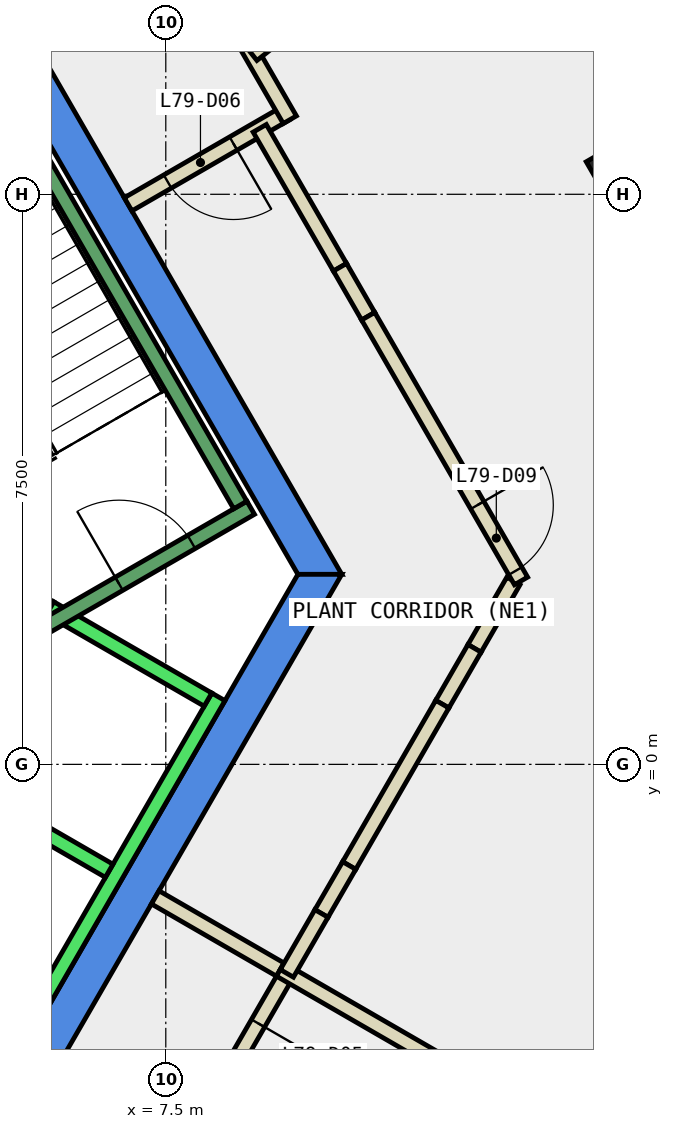
"""IFC4 building model, lengths in metres.
Left out: names, types, materials, properties, quantities, classifications, styles, units other than length and angle.
Written with IfcOpenShell. Run it as: python <this file> out.ifc"""

import sys

from ifc_helpers import new_model, si_unit, direction, frame, frame_2d, origin, origin_2d, place, context, subcontext, project, spatial, polyline, rectangle, outline, extrude, element, fill, save


model = new_model("IFC4")
c1 = context("Model", 3, precision=1e-05, world=origin(), true_north=direction((0.0, 1.0)))
c2 = subcontext(c1, "Body", "Model", "MODEL_VIEW")
j1 = project(units=[si_unit("LENGTHUNIT", "METRE"), si_unit("PLANEANGLEUNIT", "RADIAN")], contexts=[c1])
p1 = place(None, origin())
s1 = spatial("IfcSite", under=j1, at=p1, CompositionType="ELEMENT")
p2 = place(p1, origin())
s2 = spatial("IfcBuilding", under=s1, at=p2, CompositionType="ELEMENT")
p3 = place(p2, frame((0.0, 0.0, 335.9)))
s3 = spatial("IfcBuildingStorey", under=s2, at=p3, CompositionType="ELEMENT", Elevation=335.9)
p4 = place(p3, frame((13.51, 7.8, -0.35), z_axis=(0.0, 0.0, 1.0), x_axis=(-0.5, 0.866025403784, 0.0)))
e1 = element("IfcColumn", 1, at=p4, inside=s3, PredefinedType="COLUMN", context=c2, shape_type="SweptSolid", body=[
    extrude(rectangle(XDim=0.7, YDim=0.7, at=origin_2d()), origin(), (0.0, 0.0, 1.0), 4.4),
])
p5 = place(p3, frame((0.0, 0.0, -0.35)))
e2 = element("IfcWall", 2, at=p5, inside=s3, PredefinedType="SHEAR", context=c2, shape_type="SweptSolid", body=[
    extrude(outline(polyline([(5.486, 9.998), (5.053, 9.748), (9.238, 2.5), (9.815, 2.5), (5.486, 9.998)])), origin(), (0.0, 0.0, 1.0), 4.4),
])
p6 = place(p3, frame((0.0, 0.0, -0.35)))
e3 = element("IfcWall", 3, at=p6, inside=s3, PredefinedType="SHEAR", context=c2, shape_type="SweptSolid", body=[
    extrude(outline(polyline([(4.907, -6.0), (9.815, 2.5), (9.238, 2.5), (4.619, -5.5), (4.907, -6.0)])), origin(), (0.0, 0.0, 1.0), 4.4),
])
p7 = place(p3, frame((13.905, 8.604, 0.0), z_axis=(0.0, 0.0, 1.0), x_axis=(-0.509697735304, 0.86035354281, 0.0)))
e4 = element("IfcWall", 4, at=p7, inside=s3, PredefinedType="STANDARD", context=c2, shape_type="SweptSolid", body=[
    extrude(rectangle(XDim=7.098, YDim=0.3, at=frame_2d((3.549, 0.0))), origin(), (0.0, 0.0, 1.0), 4.05),
])
p8 = place(p7, frame((0.575, 0.0, 0.9)))
e5 = element("IfcOpeningElement", 5, at=p8, cuts=e4, PredefinedType="OPENING", context=c2, shape_type="SweptSolid", body=[
    extrude(rectangle(XDim=2.4, YDim=3.0, at=frame_2d((1.2, 1.5))), frame((0.0, 0.16, 0.0), z_axis=(0.0, -1.0, 0.0), x_axis=(1.0, 0.0, 0.0)), (0.0, 0.0, 1.0), 0.32),
])
p9 = place(p7, frame((4.124, 0.0, 0.9)))
e6 = element("IfcOpeningElement", 6, at=p9, cuts=e4, PredefinedType="OPENING", context=c2, shape_type="SweptSolid", body=[
    extrude(rectangle(XDim=2.4, YDim=3.0, at=frame_2d((1.2, 1.5))), frame((0.0, 0.16, 0.0), z_axis=(0.0, -1.0, 0.0), x_axis=(1.0, 0.0, 0.0)), (0.0, 0.0, 1.0), 0.32),
])
p10 = place(p3, frame((9.093, -2.75, 0.0), z_axis=(0.0, 0.0, 1.0), x_axis=(-0.500145398563, -0.865941441609, 0.0)))
e7 = element("IfcWall", 7, at=p10, inside=s3, PredefinedType="PARTITIONING", context=c2, shape_type="SweptSolid", body=[
    extrude(rectangle(XDim=1.815, YDim=0.2, at=frame_2d((0.908, 0.0))), origin(), (0.0, 0.0, 1.0), 4.05),
])
p11 = place(p10, frame((0.758, 0.0, 0.0)))
e8 = element("IfcOpeningElement", 8, at=p11, cuts=e7, PredefinedType="OPENING", context=c2, shape_type="SweptSolid", body=[
    extrude(rectangle(XDim=1.0, YDim=2.1, at=frame_2d((0.5, 1.05))), frame((0.0, 0.11, 0.0), z_axis=(0.0, -1.0, 0.0), x_axis=(1.0, 0.0, 0.0)), (0.0, 0.0, 1.0), 0.22),
])
p12 = place(p3, frame((7.361, -1.75, 0.0), z_axis=(0.0, 0.0, 1.0), x_axis=(0.865980106173, -0.500078449558, 0.0)))
e9 = element("IfcWall", 9, at=p12, inside=s3, PredefinedType="PARTITIONING", context=c2, shape_type="SweptSolid", body=[
    extrude(rectangle(XDim=1.9, YDim=0.2, at=frame_2d((0.95, 0.0))), origin(), (0.0, 0.0, 1.0), 4.05),
])
p13 = place(p3, frame((9.006, -2.7, 0.0), z_axis=(0.0, 0.0, 1.0), x_axis=(0.86601643423, -0.500015535402, 0.0)))
e10 = element("IfcWall", 10, at=p13, inside=s3, PredefinedType="PARTITIONING", context=c2, shape_type="SweptSolid", body=[
    extrude(rectangle(XDim=13.147, YDim=0.2, at=frame_2d((6.574, 0.0))), origin(), (0.0, 0.0, 1.0), 4.05),
])
p14 = place(p3, frame((9.082, 8.568, 0.0), z_axis=(0.0, 0.0, 1.0), x_axis=(-0.865955154139, -0.50012165622, 0.0)))
e11 = element("IfcWall", 11, at=p14, inside=s3, PredefinedType="PARTITIONING", context=c2, shape_type="SweptSolid", body=[
    extrude(rectangle(XDim=2.4, YDim=0.2, at=frame_2d((1.2, 0.0))), origin(), (0.0, 0.0, 1.0), 4.05),
])
p15 = place(p14, frame((0.8, 0.0, 0.0)))
e12 = element("IfcOpeningElement", 12, at=p15, cuts=e11, PredefinedType="OPENING", context=c2, shape_type="SweptSolid", body=[
    extrude(rectangle(XDim=1.0, YDim=2.1, at=frame_2d((0.5, 1.05))), frame((0.0, 0.11, 0.0), z_axis=(0.0, -1.0, 0.0), x_axis=(1.0, 0.0, 0.0)), (0.0, 0.0, 1.0), 0.22),
])
p16 = place(p3, frame((8.736, 8.368, 0.0), z_axis=(0.0, 0.0, 1.0), x_axis=(0.500206302225, -0.865906262372, 0.0)))
e13 = element("IfcWall", 13, at=p16, inside=s3, PredefinedType="PARTITIONING", context=c2, shape_type="SweptSolid", body=[
    extrude(rectangle(XDim=2.111, YDim=0.2, at=frame_2d((1.055, 0.0))), origin(), (0.0, 0.0, 1.0), 4.05),
])
p17 = place(p3, frame((12.074, 2.413, 0.0), z_axis=(0.0, 0.0, 1.0), x_axis=(-0.499804985043, -0.86613796645, 0.0)))
e14 = element("IfcWall", 14, at=p17, inside=s3, PredefinedType="PARTITIONING", context=c2, shape_type="SweptSolid", body=[
    extrude(rectangle(XDim=1.024, YDim=0.2, at=frame_2d((0.512, 0.0))), origin(), (0.0, 0.0, 1.0), 4.05),
])
p18 = place(p3, frame((7.43, 11.429, 0.0), z_axis=(0.0, 0.0, 1.0), x_axis=(0.500026652407, -0.866010015463, 0.0)))
e15 = element("IfcWall", 15, at=p18, inside=s3, PredefinedType="PARTITIONING", context=c2, shape_type="SweptSolid", body=[
    extrude(rectangle(XDim=3.404, YDim=0.2, at=frame_2d((1.702, 0.0))), origin(), (0.0, 0.0, 1.0), 4.05),
])
p19 = place(p3, frame((9.792, 6.54, 0.0), z_axis=(0.0, 0.0, 1.0), x_axis=(0.49924847323, -0.866458863408, 0.0)))
e16 = element("IfcWall", 16, at=p19, inside=s3, PredefinedType="PARTITIONING", context=c2, shape_type="SweptSolid", body=[
    extrude(rectangle(XDim=0.743, YDim=0.2, at=frame_2d((0.372, 0.0))), origin(), (0.0, 0.0, 1.0), 1.95),
])
p20 = place(p3, frame((10.163, 5.896, 0.0), z_axis=(0.0, 0.0, 1.0), x_axis=(0.500023722852, -0.866011706956, 0.0)))
e17 = element("IfcWall", 17, at=p20, inside=s3, PredefinedType="PARTITIONING", context=c2, shape_type="SweptSolid", body=[
    extrude(rectangle(XDim=4.022, YDim=0.2, at=frame_2d((2.011, 0.0))), origin(), (0.0, 0.0, 1.0), 4.05),
])
p21 = place(p20, frame((2.871, 0.0, 0.0)))
e18 = element("IfcOpeningElement", 18, at=p21, cuts=e17, PredefinedType="OPENING", context=c2, shape_type="SweptSolid", body=[
    extrude(rectangle(XDim=1.0, YDim=2.1, at=frame_2d((0.5, 1.05))), frame((0.0, 0.11, 0.0), z_axis=(0.0, -1.0, 0.0), x_axis=(1.0, 0.0, 0.0)), (0.0, 0.0, 1.0), 0.22),
])
p22 = place(p3, frame((11.562, 1.526, 0.0), z_axis=(0.0, 0.0, 1.0), x_axis=(-0.500320786851, -0.865840118177, 0.0)))
e19 = element("IfcWall", 19, at=p22, inside=s3, PredefinedType="PARTITIONING", context=c2, shape_type="SweptSolid", body=[
    extrude(rectangle(XDim=0.848, YDim=0.2, at=frame_2d((0.424, 0.0))), origin(), (0.0, 0.0, 1.0), 1.95),
])
p23 = place(p3, frame((11.138, 0.792, 0.0), z_axis=(0.0, 0.0, 1.0), x_axis=(-0.499728202161, -0.866182269482, 0.0)))
e20 = element("IfcWall", 20, at=p23, inside=s3, PredefinedType="PARTITIONING", context=c2, shape_type="SweptSolid", body=[
    extrude(rectangle(XDim=2.451, YDim=0.2, at=frame_2d((1.226, 0.0))), origin(), (0.0, 0.0, 1.0), 4.05),
])
p24 = place(p3, frame((9.913, -1.331, 0.0), z_axis=(0.0, 0.0, 1.0), x_axis=(-0.500785366854, -0.865571496957, 0.0)))
e21 = element("IfcWall", 21, at=p24, inside=s3, PredefinedType="PARTITIONING", context=c2, shape_type="SweptSolid", body=[
    extrude(rectangle(XDim=0.729, YDim=0.2, at=frame_2d((0.364, 0.0))), origin(), (0.0, 0.0, 1.0), 1.95),
])
p25 = place(p3, frame((9.548, -1.962, 0.0), z_axis=(0.0, 0.0, 1.0), x_axis=(-0.500063042646, -0.865989003036, 0.0)))
e22 = element("IfcWall", 22, at=p25, inside=s3, PredefinedType="PARTITIONING", context=c2, shape_type="SweptSolid", body=[
    extrude(rectangle(XDim=0.91, YDim=0.2, at=frame_2d((0.455, 0.0))), origin(), (0.0, 0.0, 1.0), 4.05),
])
p26 = place(p3, frame((11.007, 11.215, 0.0), z_axis=(0.0, 0.0, 1.0), x_axis=(-0.784104781382, -0.620628465198, 0.0)))
e23 = element("IfcWall", 23, at=p26, inside=s3, PredefinedType="PARTITIONING", context=c2, shape_type="SweptSolid", body=[
    extrude(rectangle(XDim=3.023, YDim=0.2, at=frame_2d((1.511, 0.0))), origin(), (0.0, 0.0, 1.0), 4.05),
])
p27 = place(p3, frame((3.24, -2.488, 0.0), z_axis=(0.0, 0.0, 1.0), x_axis=(0.500034260056, 0.866005622828, 0.0)))
e24 = element("IfcWall", 24, at=p27, inside=s3, PredefinedType="STANDARD", context=c2, shape_type="SweptSolid", body=[
    extrude(rectangle(XDim=5.399, YDim=0.2, at=frame_2d((2.7, 0.0))), origin(), (0.0, 0.0, 1.0), 4.05),
])
p28 = place(p27, frame((3.225, 0.0, 0.0)))
e25 = element("IfcOpeningElement", 25, at=p28, cuts=e24, PredefinedType="OPENING", context=c2, shape_type="SweptSolid", body=[
    extrude(rectangle(XDim=1.1, YDim=2.1, at=frame_2d((0.55, 1.05))), frame((0.0, 0.11, 0.0), z_axis=(0.0, -1.0, 0.0), x_axis=(1.0, 0.0, 0.0)), (0.0, 0.0, 1.0), 0.22),
])
p29 = place(p27, frame((1.225, 0.0, 0.0)))
e26 = element("IfcOpeningElement", 26, at=p29, cuts=e24, PredefinedType="OPENING", context=c2, shape_type="SweptSolid", body=[
    extrude(rectangle(XDim=1.1, YDim=2.1, at=frame_2d((0.55, 1.05))), frame((0.0, 0.11, 0.0), z_axis=(0.0, -1.0, 0.0), x_axis=(1.0, 0.0, 0.0)), (0.0, 0.0, 1.0), 0.22),
])
p30 = place(p3, frame((5.492, -3.788, 0.0), z_axis=(0.0, 0.0, 1.0), x_axis=(0.500034260056, 0.866005622828, 0.0)))
e27 = element("IfcWall", 27, at=p30, inside=s3, PredefinedType="STANDARD", context=c2, shape_type="SweptSolid", body=[
    extrude(rectangle(XDim=5.399, YDim=0.2, at=frame_2d((2.7, 0.0))), origin(), (0.0, 0.0, 1.0), 4.05),
])
for number, where, z_axis, x_axis in (
    (28, (4.677, -0.2, 0.0), (0.0, 0.0, 1.0), (0.866, -0.5, 0.0)),
    (29, (5.977, 2.052, 0.0), (0.0, 0.0, 1.0), (0.866, -0.5, 0.0)),
):
    element("IfcWall", number, at=place(p3, frame(where, z_axis=z_axis, x_axis=x_axis)), inside=s3, PredefinedType="STANDARD", context=c2, shape_type="SweptSolid", body=[
        extrude(rectangle(XDim=2.399, YDim=0.2, at=frame_2d((1.2, 0.0))), origin(), (0.0, 0.0, 1.0), 4.05),
    ])
p31 = place(p3, frame((4.806, 1.176, 0.0), z_axis=(0.0, 0.0, 1.0), x_axis=(0.866059941101, 0.499940174841, 0.0)))
e30 = element("IfcWall", 30, at=p31, inside=s3, PredefinedType="STANDARD", context=c2, shape_type="SweptSolid", body=[
    extrude(rectangle(XDim=4.4, YDim=0.2, at=frame_2d((2.2, 0.0))), origin(), (0.0, 0.0, 1.0), 4.05),
])
p32 = place(p31, frame((2.4, 0.0, 0.0)))
e31 = element("IfcOpeningElement", 31, at=p32, cuts=e30, PredefinedType="OPENING", context=c2, shape_type="SweptSolid", body=[
    extrude(rectangle(XDim=1.1, YDim=2.2, at=frame_2d((0.55, 1.1))), frame((0.0, 0.11, 0.0), z_axis=(0.0, -1.0, 0.0), x_axis=(1.0, 0.0, 0.0)), (0.0, 0.0, 1.0), 0.22),
])
p33 = place(p3, frame((8.48, 3.412, 0.0), z_axis=(0.0, 0.0, 1.0), x_axis=(-0.499978703459, 0.866037698999, 0.0)))
e32 = element("IfcWall", 32, at=p33, inside=s3, PredefinedType="STANDARD", context=c2, shape_type="SweptSolid", body=[
    extrude(rectangle(XDim=6.9, YDim=0.2, at=frame_2d((3.45, 0.0))), origin(), (0.0, 0.0, 1.0), 4.05),
])
p34 = place(p8, origin())
e33 = element("IfcWindow", 33, at=p34, inside=s3, PartitioningType="SINGLE_PANEL", PredefinedType="WINDOW", context=c2, shape_type="SweptSolid", body=[
    extrude(rectangle(XDim=2.4, YDim=3.0, at=frame_2d((1.2, 1.5))), frame((0.0, 0.03, 0.0), z_axis=(0.0, -1.0, 0.0), x_axis=(1.0, 0.0, 0.0)), (0.0, 0.0, 1.0), 0.06),
])
fill(e5, e33)
p35 = place(p11, origin())
e34 = element("IfcDoor", 34, at=p35, inside=s3, OperationType="SINGLE_SWING_LEFT", PredefinedType="DOOR", context=c2, shape_type="SweptSolid", body=[
    extrude(rectangle(XDim=1.0, YDim=2.1, at=frame_2d((0.5, 1.05))), frame((0.0, 0.025, 0.0), z_axis=(0.0, -1.0, 0.0), x_axis=(1.0, 0.0, 0.0)), (0.0, 0.0, 1.0), 0.05),
])
fill(e8, e34)
p36 = place(p15, origin())
e35 = element("IfcDoor", 35, at=p36, inside=s3, OperationType="SINGLE_SWING_LEFT", PredefinedType="DOOR", context=c2, shape_type="SweptSolid", body=[
    extrude(rectangle(XDim=1.0, YDim=2.1, at=frame_2d((0.5, 1.05))), frame((0.0, 0.025, 0.0), z_axis=(0.0, -1.0, 0.0), x_axis=(1.0, 0.0, 0.0)), (0.0, 0.0, 1.0), 0.05),
])
fill(e12, e35)
p37 = place(p21, origin())
e36 = element("IfcDoor", 36, at=p37, inside=s3, OperationType="SINGLE_SWING_RIGHT", PredefinedType="DOOR", context=c2, shape_type="SweptSolid", body=[
    extrude(rectangle(XDim=1.0, YDim=2.1, at=frame_2d((0.5, 1.05))), frame((0.0, 0.025, 0.0), z_axis=(0.0, -1.0, 0.0), x_axis=(1.0, 0.0, 0.0)), (0.0, 0.0, 1.0), 0.05),
])
fill(e18, e36)
p38 = place(p32, origin())
e37 = element("IfcDoor", 37, at=p38, inside=s3, OperationType="SINGLE_SWING_LEFT", PredefinedType="DOOR", context=c2, shape_type="SweptSolid", body=[
    extrude(rectangle(XDim=1.1, YDim=2.2, at=frame_2d((0.55, 1.1))), frame((0.0, 0.025, 0.0), z_axis=(0.0, -1.0, 0.0), x_axis=(1.0, 0.0, 0.0)), (0.0, 0.0, 1.0), 0.05),
])
fill(e31, e37)
save(model, sys.argv[1])
